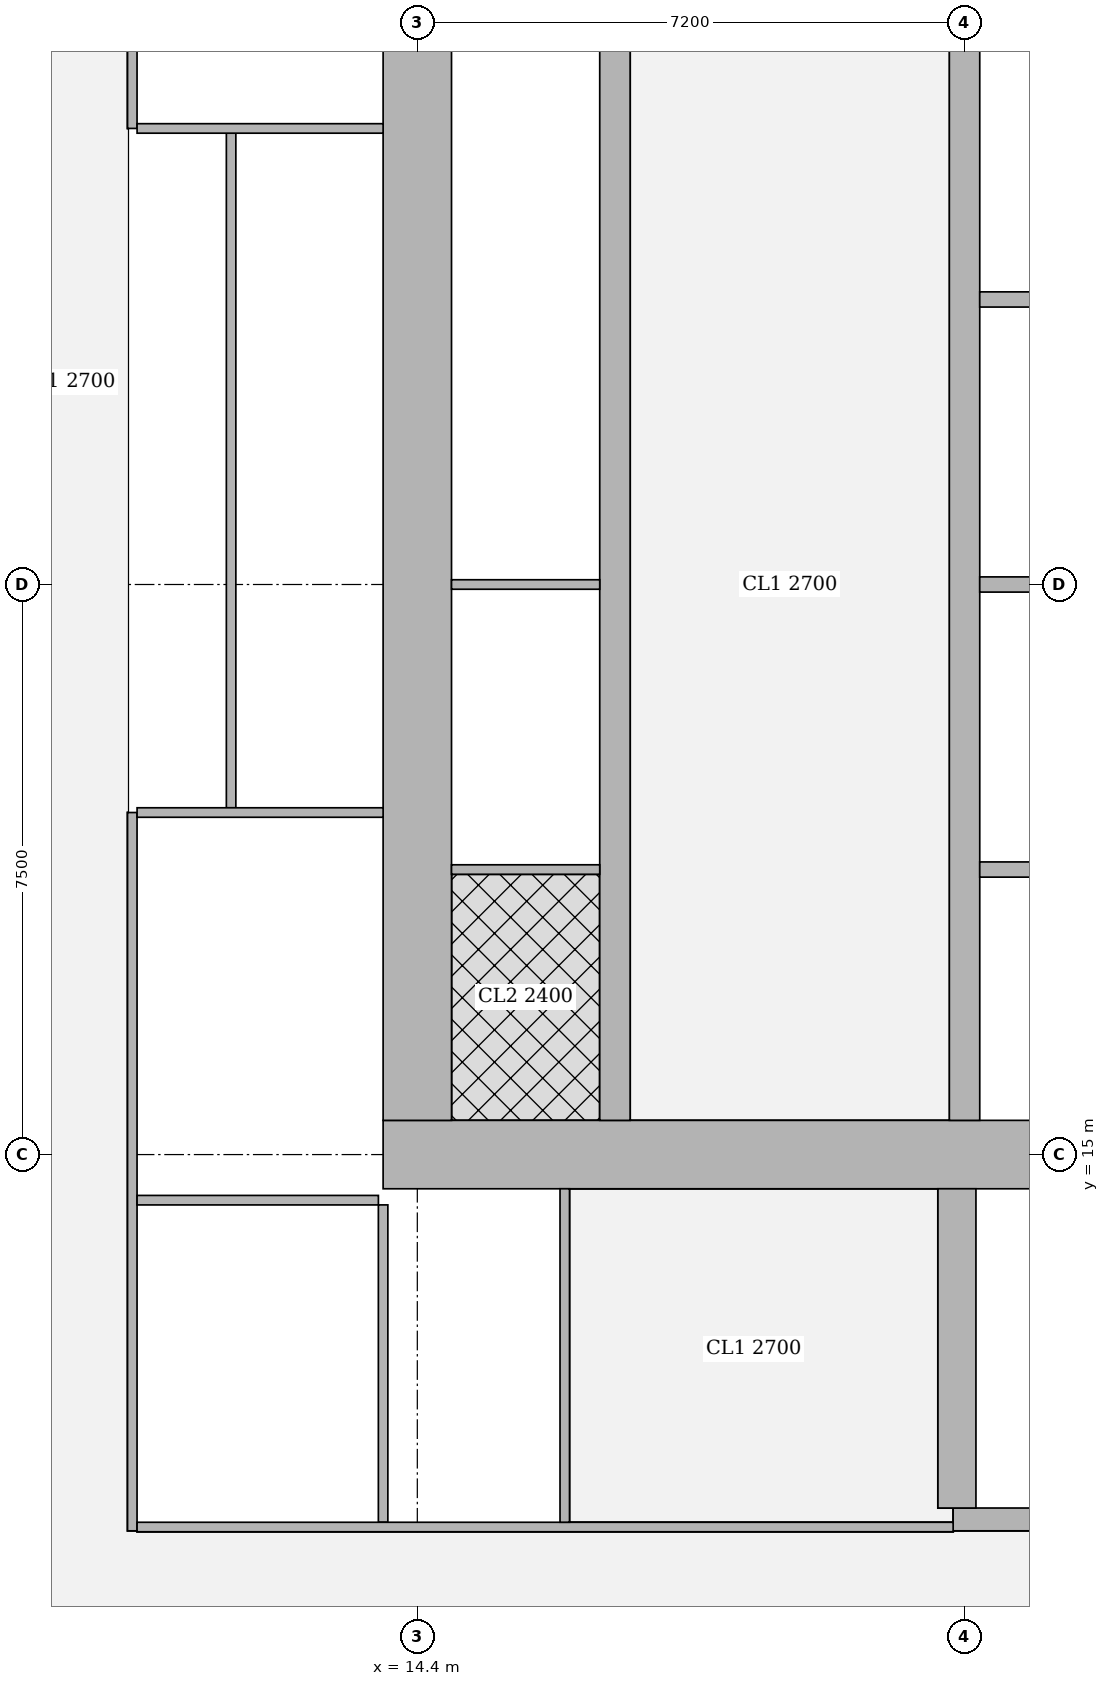
"""IFC4 building model, lengths in metres.
Left out: names, types, materials, properties, quantities, classifications, styles, units other than length and angle.
Written with IfcOpenShell. Run it as: python <this file> out.ifc"""

import sys

from ifc_helpers import new_model, si_unit, direction, frame, frame_2d, origin, place, context, subcontext, project, spatial, rectangle, extrude, element, fill, save


model = new_model("IFC4")
c1 = context("Model", 3, precision=1e-05, world=origin(), true_north=direction((0.0, 1.0)))
c2 = subcontext(c1, "Body", "Model", "MODEL_VIEW")
j1 = project(units=[si_unit("LENGTHUNIT", "METRE"), si_unit("PLANEANGLEUNIT", "RADIAN")], contexts=[c1])
p1 = place(None, origin())
s1 = spatial("IfcSite", under=j1, at=p1, CompositionType="ELEMENT")
p2 = place(p1, origin())
s2 = spatial("IfcBuilding", under=s1, at=p2, CompositionType="ELEMENT")
p3 = place(p2, frame((0.0, 0.0, 216.2)))
s3 = spatial("IfcBuildingStorey", under=s2, at=p3, CompositionType="ELEMENT", Elevation=216.2)
p4 = place(p3, frame((13.95, 15.0, 0.0), z_axis=(0.0, 0.0, 1.0), x_axis=(1.0, 0.0, 0.0)))
e1 = element("IfcWall", 1, at=p4, inside=s3, PredefinedType="SHEAR", context=c2, shape_type="SweptSolid", body=[
    extrude(rectangle(XDim=15.3, YDim=0.9, at=frame_2d((7.65, 0.0))), origin(), (0.0, 0.0, 1.0), 3.75),
])
p5 = place(p4, frame((4.45, 0.0, 0.0)))
e2 = element("IfcOpeningElement", 2, at=p5, cuts=e1, PredefinedType="OPENING", context=c2, shape_type="SweptSolid", body=[
    extrude(rectangle(XDim=1.8, YDim=2.1, at=frame_2d((0.9, 1.05))), frame((0.0, 0.46, 0.0), z_axis=(0.0, -1.0, 0.0), x_axis=(1.0, 0.0, 0.0)), (0.0, 0.0, 1.0), 0.92),
])
p6 = place(p4, frame((10.7, 0.0, 0.0)))
e3 = element("IfcOpeningElement", 3, at=p6, cuts=e1, PredefinedType="OPENING", context=c2, shape_type="SweptSolid", body=[
    extrude(rectangle(XDim=1.1, YDim=2.1, at=frame_2d((0.55, 1.05))), frame((0.0, 0.46, 0.0), z_axis=(0.0, -1.0, 0.0), x_axis=(1.0, 0.0, 0.0)), (0.0, 0.0, 1.0), 0.92),
])
p7 = place(p3, frame((14.4, 15.45, 0.0), z_axis=(0.0, 0.0, 1.0), x_axis=(0.0, 1.0, 0.0)))
e4 = element("IfcWall", 4, at=p7, inside=s3, PredefinedType="SHEAR", context=c2, shape_type="SweptSolid", body=[
    extrude(rectangle(XDim=14.1, YDim=0.9, at=frame_2d((7.05, 0.0))), origin(), (0.0, 0.0, 1.0), 3.75),
])
p8 = place(p3, frame((17.0, 15.45, 0.0), z_axis=(0.0, 0.0, 1.0), x_axis=(0.0, 1.0, 0.0)))
e5 = element("IfcWall", 5, at=p8, inside=s3, PredefinedType="SHEAR", context=c2, shape_type="SweptSolid", body=[
    extrude(rectangle(XDim=14.1, YDim=0.4, at=frame_2d((7.05, 0.0))), origin(), (0.0, 0.0, 1.0), 3.75),
])
p9 = place(p8, frame((0.925, 0.0, 0.0)))
e6 = element("IfcOpeningElement", 6, at=p9, cuts=e5, PredefinedType="OPENING", context=c2, shape_type="SweptSolid", body=[
    extrude(rectangle(XDim=1.0, YDim=2.1, at=frame_2d((0.5, 1.05))), frame((0.0, 0.21, 0.0), z_axis=(0.0, -1.0, 0.0), x_axis=(1.0, 0.0, 0.0)), (0.0, 0.0, 1.0), 0.42),
])
p10 = place(p8, frame((4.675, 0.0, 0.0)))
e7 = element("IfcOpeningElement", 7, at=p10, cuts=e5, PredefinedType="OPENING", context=c2, shape_type="SweptSolid", body=[
    extrude(rectangle(XDim=1.0, YDim=2.1, at=frame_2d((0.5, 1.05))), frame((0.0, 0.21, 0.0), z_axis=(0.0, -1.0, 0.0), x_axis=(1.0, 0.0, 0.0)), (0.0, 0.0, 1.0), 0.42),
])
p11 = place(p8, frame((8.425, 0.0, 0.0)))
e8 = element("IfcOpeningElement", 8, at=p11, cuts=e5, PredefinedType="OPENING", context=c2, shape_type="SweptSolid", body=[
    extrude(rectangle(XDim=1.0, YDim=2.1, at=frame_2d((0.5, 1.05))), frame((0.0, 0.21, 0.0), z_axis=(0.0, -1.0, 0.0), x_axis=(1.0, 0.0, 0.0)), (0.0, 0.0, 1.0), 0.42),
])
p12 = place(p8, frame((12.175, 0.0, 0.0)))
e9 = element("IfcOpeningElement", 9, at=p12, cuts=e5, PredefinedType="OPENING", context=c2, shape_type="SweptSolid", body=[
    extrude(rectangle(XDim=1.0, YDim=2.1, at=frame_2d((0.5, 1.05))), frame((0.0, 0.21, 0.0), z_axis=(0.0, -1.0, 0.0), x_axis=(1.0, 0.0, 0.0)), (0.0, 0.0, 1.0), 0.42),
])
p13 = place(p3, frame((21.6, 15.45, 0.0), z_axis=(0.0, 0.0, 1.0), x_axis=(0.0, 1.0, 0.0)))
e10 = element("IfcWall", 10, at=p13, inside=s3, PredefinedType="SHEAR", context=c2, shape_type="SweptSolid", body=[
    extrude(rectangle(XDim=14.1, YDim=0.4, at=frame_2d((7.05, 0.0))), origin(), (0.0, 0.0, 1.0), 3.75),
])
p14 = place(p13, frame((0.875, 0.0, 0.0)))
e11 = element("IfcOpeningElement", 11, at=p14, cuts=e10, PredefinedType="OPENING", context=c2, shape_type="SweptSolid", body=[
    extrude(rectangle(XDim=1.1, YDim=2.1, at=frame_2d((0.55, 1.05))), frame((0.0, 0.21, 0.0), z_axis=(0.0, -1.0, 0.0), x_axis=(1.0, 0.0, 0.0)), (0.0, 0.0, 1.0), 0.42),
])
p15 = place(p13, frame((4.625, 0.0, 0.0)))
e12 = element("IfcOpeningElement", 12, at=p15, cuts=e10, PredefinedType="OPENING", context=c2, shape_type="SweptSolid", body=[
    extrude(rectangle(XDim=1.1, YDim=2.1, at=frame_2d((0.55, 1.05))), frame((0.0, 0.21, 0.0), z_axis=(0.0, -1.0, 0.0), x_axis=(1.0, 0.0, 0.0)), (0.0, 0.0, 1.0), 0.42),
])
p16 = place(p13, frame((8.375, 0.0, 0.0)))
e13 = element("IfcOpeningElement", 13, at=p16, cuts=e10, PredefinedType="OPENING", context=c2, shape_type="SweptSolid", body=[
    extrude(rectangle(XDim=1.1, YDim=2.1, at=frame_2d((0.55, 1.05))), frame((0.0, 0.21, 0.0), z_axis=(0.0, -1.0, 0.0), x_axis=(1.0, 0.0, 0.0)), (0.0, 0.0, 1.0), 0.42),
])
p17 = place(p13, frame((12.125, 0.0, 0.0)))
e14 = element("IfcOpeningElement", 14, at=p17, cuts=e10, PredefinedType="OPENING", context=c2, shape_type="SweptSolid", body=[
    extrude(rectangle(XDim=1.1, YDim=2.1, at=frame_2d((0.55, 1.05))), frame((0.0, 0.21, 0.0), z_axis=(0.0, -1.0, 0.0), x_axis=(1.0, 0.0, 0.0)), (0.0, 0.0, 1.0), 0.42),
])
p18 = place(p3, frame((21.45, 10.2, 0.0), z_axis=(0.0, 0.0, 1.0), x_axis=(1.0, 0.0, 0.0)))
e15 = element("IfcWall", 15, at=p18, inside=s3, PredefinedType="SHEAR", context=c2, shape_type="SweptSolid", body=[
    extrude(rectangle(XDim=7.5, YDim=0.3, at=frame_2d((3.75, 0.0))), origin(), (0.0, 0.0, 1.0), 3.75),
])
p19 = place(p18, frame((0.5, 0.0, 0.0)))
e16 = element("IfcOpeningElement", 16, at=p19, cuts=e15, PredefinedType="OPENING", context=c2, shape_type="SweptSolid", body=[
    extrude(rectangle(XDim=1.1, YDim=2.1, at=frame_2d((0.55, 1.05))), frame((0.0, 0.16, 0.0), z_axis=(0.0, -1.0, 0.0), x_axis=(1.0, 0.0, 0.0)), (0.0, 0.0, 1.0), 0.32),
])
p20 = place(p3, frame((21.5, 10.35, 0.0), z_axis=(0.0, 0.0, 1.0), x_axis=(0.0, 1.0, 0.0)))
e17 = element("IfcWall", 17, at=p20, inside=s3, PredefinedType="SHEAR", context=c2, shape_type="SweptSolid", body=[
    extrude(rectangle(XDim=4.2, YDim=0.5, at=frame_2d((2.1, 0.0))), origin(), (0.0, 0.0, 1.0), 3.75),
])
p21 = place(p3, frame((10.65, 10.05, 0.0), z_axis=(0.0, 0.0, 1.0), x_axis=(0.0, 1.0, 0.0)))
e18 = element("IfcWall", 18, at=p21, inside=s3, PredefinedType="PARTITIONING", context=c2, shape_type="SweptSolid", body=[
    extrude(rectangle(XDim=9.45, YDim=0.125, at=frame_2d((4.725, 0.0))), origin(), (0.0, 0.0, 1.0), 3.5),
])
p22 = place(p21, frame((1.675, 0.0, 0.0)))
e19 = element("IfcOpeningElement", 19, at=p22, cuts=e18, PredefinedType="OPENING", context=c2, shape_type="SweptSolid", body=[
    extrude(rectangle(XDim=1.0, YDim=2.1, at=frame_2d((0.5, 1.05))), frame((0.0, 0.073, 0.0), z_axis=(0.0, -1.0, 0.0), x_axis=(1.0, 0.0, 0.0)), (0.0, 0.0, 1.0), 0.145),
])
p23 = place(p21, frame((6.4, 0.0, 0.0)))
e20 = element("IfcOpeningElement", 20, at=p23, cuts=e18, PredefinedType="OPENING", context=c2, shape_type="SweptSolid", body=[
    extrude(rectangle(XDim=1.0, YDim=2.1, at=frame_2d((0.5, 1.05))), frame((0.0, 0.073, 0.0), z_axis=(0.0, -1.0, 0.0), x_axis=(1.0, 0.0, 0.0)), (0.0, 0.0, 1.0), 0.145),
])
p24 = place(p3, frame((10.65, 28.5, 0.0), z_axis=(0.0, 0.0, 1.0), x_axis=(0.0, 1.0, 0.0)))
e21 = element("IfcWall", 21, at=p24, inside=s3, PredefinedType="PARTITIONING", context=c2, shape_type="SweptSolid", body=[
    extrude(rectangle(XDim=6.45, YDim=0.125, at=frame_2d((3.225, 0.0))), origin(), (0.0, 0.0, 1.0), 3.5),
])
p25 = place(p24, frame((0.85, 0.0, 0.0)))
e22 = element("IfcOpeningElement", 22, at=p25, cuts=e21, PredefinedType="OPENING", context=c2, shape_type="SweptSolid", body=[
    extrude(rectangle(XDim=1.0, YDim=2.1, at=frame_2d((0.5, 1.05))), frame((0.0, 0.073, 0.0), z_axis=(0.0, -1.0, 0.0), x_axis=(1.0, 0.0, 0.0)), (0.0, 0.0, 1.0), 0.145),
])
p26 = place(p24, frame((4.075, 0.0, 0.0)))
e23 = element("IfcOpeningElement", 23, at=p26, cuts=e21, PredefinedType="OPENING", context=c2, shape_type="SweptSolid", body=[
    extrude(rectangle(XDim=1.0, YDim=2.1, at=frame_2d((0.5, 1.05))), frame((0.0, 0.073, 0.0), z_axis=(0.0, -1.0, 0.0), x_axis=(1.0, 0.0, 0.0)), (0.0, 0.0, 1.0), 0.145),
])
p27 = place(p3, frame((11.95, 19.562, 0.0), z_axis=(0.0, 0.0, 1.0), x_axis=(0.0, 1.0, 0.0)))
e24 = element("IfcWall", 24, at=p27, inside=s3, PredefinedType="PARTITIONING", context=c2, shape_type="SweptSolid", body=[
    extrude(rectangle(XDim=8.876, YDim=0.125, at=frame_2d((4.438, 0.0))), origin(), (0.0, 0.0, 1.0), 3.5),
])
p28 = place(p27, frame((3.938, 0.0, 0.0)))
e25 = element("IfcOpeningElement", 25, at=p28, cuts=e24, PredefinedType="OPENING", context=c2, shape_type="SweptSolid", body=[
    extrude(rectangle(XDim=1.0, YDim=2.1, at=frame_2d((0.5, 1.05))), frame((0.0, 0.073, 0.0), z_axis=(0.0, -1.0, 0.0), x_axis=(1.0, 0.0, 0.0)), (0.0, 0.0, 1.0), 0.145),
])
p29 = place(p3, frame((10.713, 14.4, 0.0), z_axis=(0.0, 0.0, 1.0), x_axis=(1.0, 0.0, 0.0)))
e26 = element("IfcWall", 26, at=p29, inside=s3, PredefinedType="PARTITIONING", context=c2, shape_type="SweptSolid", body=[
    extrude(rectangle(XDim=3.175, YDim=0.125, at=frame_2d((1.587, 0.0))), origin(), (0.0, 0.0, 1.0), 3.5),
])
for number, where, z_axis, x_axis in (
    (27, (10.713, 19.5, 0.0), (0.0, 0.0, 1.0), (1.0, 0.0, 0.0)),
    (28, (10.713, 28.5, 0.0), (0.0, 0.0, 1.0), (1.0, 0.0, 0.0)),
):
    element("IfcWall", number, at=place(p3, frame(where, z_axis=z_axis, x_axis=x_axis)), inside=s3, PredefinedType="PARTITIONING", context=c2, shape_type="SweptSolid", body=[
        extrude(rectangle(XDim=3.237, YDim=0.125, at=frame_2d((1.619, 0.0))), origin(), (0.0, 0.0, 1.0), 3.5),
    ])
p30 = place(p3, frame((13.95, 10.163, 0.0), z_axis=(0.0, 0.0, 1.0), x_axis=(0.0, 1.0, 0.0)))
e29 = element("IfcWall", 29, at=p30, inside=s3, PredefinedType="PARTITIONING", context=c2, shape_type="SweptSolid", body=[
    extrude(rectangle(XDim=4.175, YDim=0.125, at=frame_2d((2.087, 0.0))), origin(), (0.0, 0.0, 1.0), 3.5),
])
p31 = place(p3, frame((10.713, 10.1, 0.0), z_axis=(0.0, 0.0, 1.0), x_axis=(1.0, 0.0, 0.0)))
e30 = element("IfcWall", 30, at=p31, inside=s3, PredefinedType="PARTITIONING", context=c2, shape_type="SweptSolid", body=[
    extrude(rectangle(XDim=10.737, YDim=0.125, at=frame_2d((5.369, 0.0))), origin(), (0.0, 0.0, 1.0), 3.5),
])
p32 = place(p31, frame((7.282, 0.0, 0.0)))
e31 = element("IfcOpeningElement", 31, at=p32, cuts=e30, PredefinedType="OPENING", context=c2, shape_type="SweptSolid", body=[
    extrude(rectangle(XDim=1.8, YDim=2.1, at=frame_2d((0.9, 1.05))), frame((0.0, 0.073, 0.0), z_axis=(0.0, -1.0, 0.0), x_axis=(1.0, 0.0, 0.0)), (0.0, 0.0, 1.0), 0.145),
])
p33 = place(p3, frame((16.34, 10.163, 0.0), z_axis=(0.0, 0.0, 1.0), x_axis=(0.0, 1.0, 0.0)))
e32 = element("IfcWall", 32, at=p33, inside=s3, PredefinedType="PARTITIONING", context=c2, shape_type="SweptSolid", body=[
    extrude(rectangle(XDim=4.387, YDim=0.125, at=frame_2d((2.193, 0.0))), origin(), (0.0, 0.0, 1.0), 3.5),
])
p34 = place(p33, frame((1.637, 0.0, 0.0)))
e33 = element("IfcOpeningElement", 33, at=p34, cuts=e32, PredefinedType="OPENING", context=c2, shape_type="SweptSolid", body=[
    extrude(rectangle(XDim=1.0, YDim=2.1, at=frame_2d((0.5, 1.05))), frame((0.0, 0.073, 0.0), z_axis=(0.0, -1.0, 0.0), x_axis=(1.0, 0.0, 0.0)), (0.0, 0.0, 1.0), 0.145),
])
for number, where, z_axis, x_axis in (
    (34, (14.85, 18.75, 0.0), (0.0, 0.0, 1.0), (1.0, 0.0, 0.0)),
    (35, (14.85, 22.5, 0.0), (0.0, 0.0, 1.0), (1.0, 0.0, 0.0)),
):
    element("IfcWall", number, at=place(p3, frame(where, z_axis=z_axis, x_axis=x_axis)), inside=s3, PredefinedType="PARTITIONING", context=c2, shape_type="SweptSolid", body=[
        extrude(rectangle(XDim=1.95, YDim=0.125, at=frame_2d((0.975, 0.0))), origin(), (0.0, 0.0, 1.0), 3.5),
    ])
for number, where, z_axis, x_axis in (
    (36, (21.8, 18.75, 0.0), (0.0, 0.0, 1.0), (1.0, 0.0, 0.0)),
    (37, (21.8, 22.5, 0.0), (0.0, 0.0, 1.0), (1.0, 0.0, 0.0)),
    (38, (21.8, 26.25, 0.0), (0.0, 0.0, 1.0), (1.0, 0.0, 0.0)),
):
    element("IfcWall", number, at=place(p3, frame(where, z_axis=z_axis, x_axis=x_axis)), inside=s3, PredefinedType="SOLIDWALL", context=c2, shape_type="SweptSolid", body=[
        extrude(rectangle(XDim=2.2, YDim=0.2, at=frame_2d((1.1, 0.0))), origin(), (0.0, 0.0, 1.0), 3.5),
    ])
p35 = place(p22, origin())
e39 = element("IfcDoor", 39, at=p35, inside=s3, OperationType="SINGLE_SWING_RIGHT", PredefinedType="DOOR", context=c2, shape_type="SweptSolid", body=[
    extrude(rectangle(XDim=1.0, YDim=2.1, at=frame_2d((0.5, 1.05))), frame((0.0, 0.025, 0.0), z_axis=(0.0, -1.0, 0.0), x_axis=(1.0, 0.0, 0.0)), (0.0, 0.0, 1.0), 0.05),
])
fill(e19, e39)
p36 = place(p23, origin())
e40 = element("IfcDoor", 40, at=p36, inside=s3, OperationType="SINGLE_SWING_LEFT", PredefinedType="DOOR", context=c2, shape_type="SweptSolid", body=[
    extrude(rectangle(XDim=1.0, YDim=2.1, at=frame_2d((0.5, 1.05))), frame((0.0, 0.025, 0.0), z_axis=(0.0, -1.0, 0.0), x_axis=(1.0, 0.0, 0.0)), (0.0, 0.0, 1.0), 0.05),
])
fill(e20, e40)
p37 = place(p28, origin())
e41 = element("IfcDoor", 41, at=p37, inside=s3, OperationType="SINGLE_SWING_LEFT", PredefinedType="DOOR", context=c2, shape_type="SweptSolid", body=[
    extrude(rectangle(XDim=1.0, YDim=2.1, at=frame_2d((0.5, 1.05))), frame((0.0, 0.025, 0.0), z_axis=(0.0, -1.0, 0.0), x_axis=(1.0, 0.0, 0.0)), (0.0, 0.0, 1.0), 0.05),
])
fill(e25, e41)
p38 = place(p25, origin())
e42 = element("IfcDoor", 42, at=p38, inside=s3, OperationType="SINGLE_SWING_RIGHT", PredefinedType="DOOR", context=c2, shape_type="SweptSolid", body=[
    extrude(rectangle(XDim=1.0, YDim=2.1, at=frame_2d((0.5, 1.05))), frame((0.0, 0.025, 0.0), z_axis=(0.0, -1.0, 0.0), x_axis=(1.0, 0.0, 0.0)), (0.0, 0.0, 1.0), 0.05),
])
fill(e22, e42)
p39 = place(p34, origin())
e43 = element("IfcDoor", 43, at=p39, inside=s3, OperationType="SINGLE_SWING_LEFT", PredefinedType="DOOR", context=c2, shape_type="SweptSolid", body=[
    extrude(rectangle(XDim=1.0, YDim=2.1, at=frame_2d((0.5, 1.05))), frame((0.0, 0.025, 0.0), z_axis=(0.0, -1.0, 0.0), x_axis=(1.0, 0.0, 0.0)), (0.0, 0.0, 1.0), 0.05),
])
fill(e33, e43)
p40 = place(p32, origin())
e44 = element("IfcDoor", 44, at=p40, inside=s3, OperationType="DOUBLE_DOOR_SINGLE_SWING", PredefinedType="DOOR", context=c2, shape_type="SweptSolid", body=[
    extrude(rectangle(XDim=1.8, YDim=2.1, at=frame_2d((0.9, 1.05))), frame((0.0, 0.025, 0.0), z_axis=(0.0, -1.0, 0.0), x_axis=(1.0, 0.0, 0.0)), (0.0, 0.0, 1.0), 0.05),
])
fill(e31, e44)
p41 = place(p9, origin())
e45 = element("IfcDoor", 45, at=p41, inside=s3, OperationType="SINGLE_SWING_LEFT", PredefinedType="DOOR", context=c2, shape_type="SweptSolid", body=[
    extrude(rectangle(XDim=1.0, YDim=2.1, at=frame_2d((0.5, 1.05))), frame((0.0, 0.025, 0.0), z_axis=(0.0, -1.0, 0.0), x_axis=(1.0, 0.0, 0.0)), (0.0, 0.0, 1.0), 0.05),
])
fill(e6, e45)
p42 = place(p10, origin())
e46 = element("IfcDoor", 46, at=p42, inside=s3, OperationType="SINGLE_SWING_LEFT", PredefinedType="DOOR", context=c2, shape_type="SweptSolid", body=[
    extrude(rectangle(XDim=1.0, YDim=2.1, at=frame_2d((0.5, 1.05))), frame((0.0, 0.025, 0.0), z_axis=(0.0, -1.0, 0.0), x_axis=(1.0, 0.0, 0.0)), (0.0, 0.0, 1.0), 0.05),
])
fill(e7, e46)
p43 = place(p11, origin())
e47 = element("IfcDoor", 47, at=p43, inside=s3, OperationType="SINGLE_SWING_LEFT", PredefinedType="DOOR", context=c2, shape_type="SweptSolid", body=[
    extrude(rectangle(XDim=1.0, YDim=2.1, at=frame_2d((0.5, 1.05))), frame((0.0, 0.025, 0.0), z_axis=(0.0, -1.0, 0.0), x_axis=(1.0, 0.0, 0.0)), (0.0, 0.0, 1.0), 0.05),
])
fill(e8, e47)
p44 = place(p12, origin())
e48 = element("IfcDoor", 48, at=p44, inside=s3, OperationType="SINGLE_SWING_RIGHT", PredefinedType="DOOR", context=c2, shape_type="SweptSolid", body=[
    extrude(rectangle(XDim=1.0, YDim=2.1, at=frame_2d((0.5, 1.05))), frame((0.0, 0.025, 0.0), z_axis=(0.0, -1.0, 0.0), x_axis=(1.0, 0.0, 0.0)), (0.0, 0.0, 1.0), 0.05),
])
fill(e9, e48)
p45 = place(p5, origin())
e49 = element("IfcDoor", 49, at=p45, inside=s3, OperationType="DOUBLE_DOOR_SINGLE_SWING", PredefinedType="DOOR", context=c2, shape_type="SweptSolid", body=[
    extrude(rectangle(XDim=1.8, YDim=2.1, at=frame_2d((0.9, 1.05))), frame((0.0, 0.025, 0.0), z_axis=(0.0, -1.0, 0.0), x_axis=(1.0, 0.0, 0.0)), (0.0, 0.0, 1.0), 0.05),
])
fill(e2, e49)
p46 = place(p14, origin())
e50 = element("IfcDoor", 50, at=p46, inside=s3, OperationType="DOUBLE_DOOR_SLIDING", PredefinedType="DOOR", context=c2, shape_type="SweptSolid", body=[
    extrude(rectangle(XDim=1.1, YDim=2.1, at=frame_2d((0.55, 1.05))), frame((0.0, 0.025, 0.0), z_axis=(0.0, -1.0, 0.0), x_axis=(1.0, 0.0, 0.0)), (0.0, 0.0, 1.0), 0.05),
])
fill(e11, e50)
p47 = place(p15, origin())
e51 = element("IfcDoor", 51, at=p47, inside=s3, OperationType="DOUBLE_DOOR_SLIDING", PredefinedType="DOOR", context=c2, shape_type="SweptSolid", body=[
    extrude(rectangle(XDim=1.1, YDim=2.1, at=frame_2d((0.55, 1.05))), frame((0.0, 0.025, 0.0), z_axis=(0.0, -1.0, 0.0), x_axis=(1.0, 0.0, 0.0)), (0.0, 0.0, 1.0), 0.05),
])
fill(e12, e51)
p48 = place(p16, origin())
e52 = element("IfcDoor", 52, at=p48, inside=s3, OperationType="DOUBLE_DOOR_SLIDING", PredefinedType="DOOR", context=c2, shape_type="SweptSolid", body=[
    extrude(rectangle(XDim=1.1, YDim=2.1, at=frame_2d((0.55, 1.05))), frame((0.0, 0.025, 0.0), z_axis=(0.0, -1.0, 0.0), x_axis=(1.0, 0.0, 0.0)), (0.0, 0.0, 1.0), 0.05),
])
fill(e13, e52)
p49 = place(p17, origin())
e53 = element("IfcDoor", 53, at=p49, inside=s3, OperationType="DOUBLE_DOOR_SLIDING", PredefinedType="DOOR", context=c2, shape_type="SweptSolid", body=[
    extrude(rectangle(XDim=1.1, YDim=2.1, at=frame_2d((0.55, 1.05))), frame((0.0, 0.025, 0.0), z_axis=(0.0, -1.0, 0.0), x_axis=(1.0, 0.0, 0.0)), (0.0, 0.0, 1.0), 0.05),
])
fill(e14, e53)
p50 = place(p19, origin())
e54 = element("IfcDoor", 54, at=p50, inside=s3, OperationType="SINGLE_SWING_LEFT", PredefinedType="DOOR", context=c2, shape_type="SweptSolid", body=[
    extrude(rectangle(XDim=1.1, YDim=2.1, at=frame_2d((0.55, 1.05))), frame((0.0, 0.025, 0.0), z_axis=(0.0, -1.0, 0.0), x_axis=(1.0, 0.0, 0.0)), (0.0, 0.0, 1.0), 0.05),
])
fill(e16, e54)
save(model, sys.argv[1])
